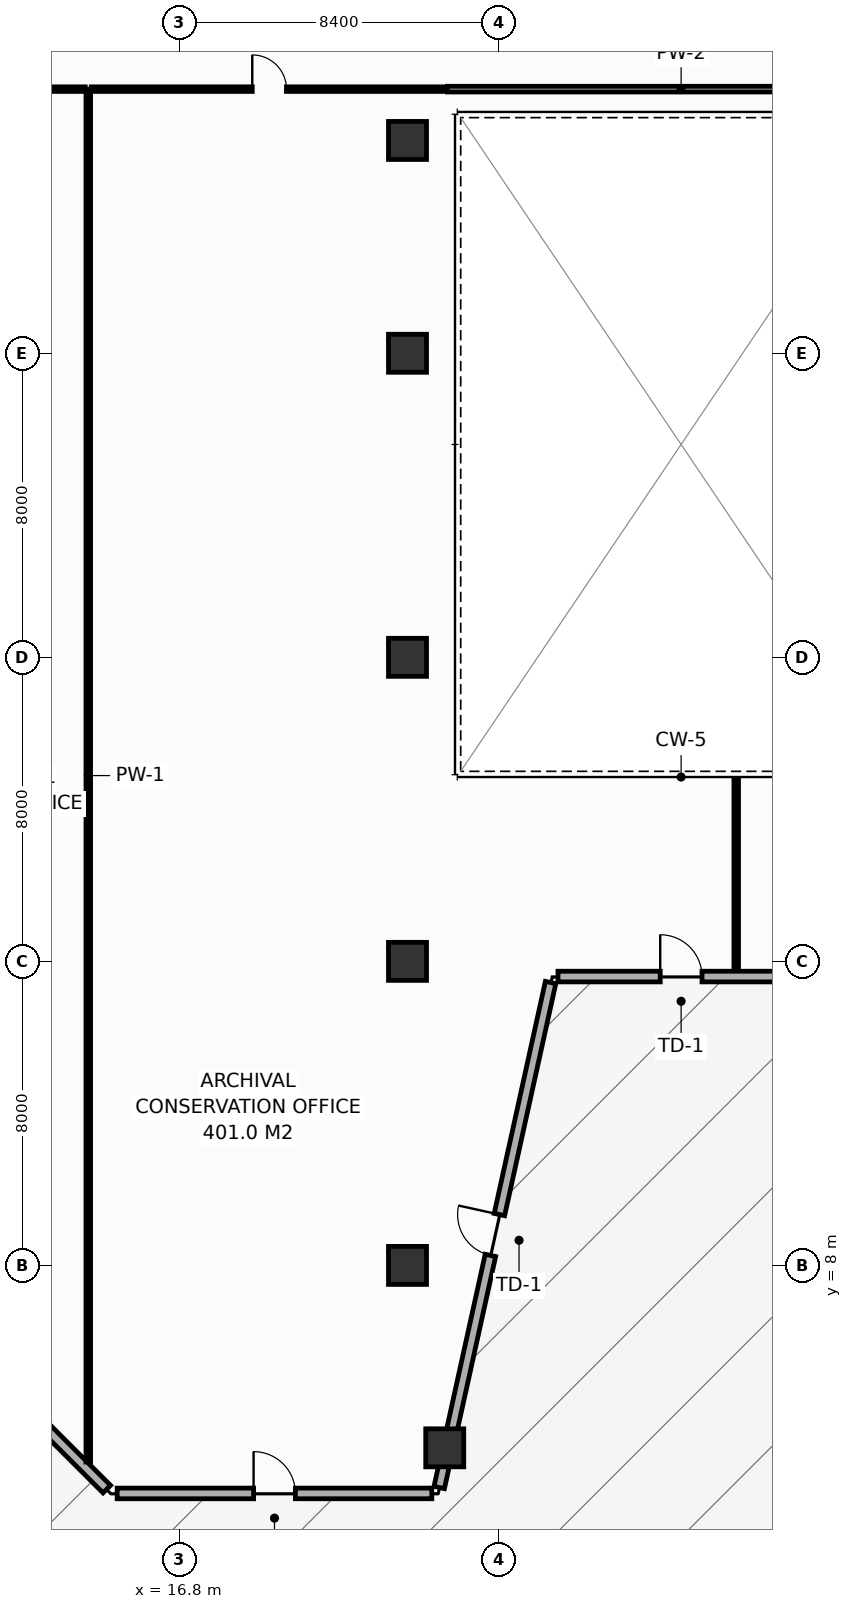
"""IFC4 building model, lengths in metres.
Left out: names, types, materials, properties, quantities, classifications, styles, units other than length and angle.
Written with IfcOpenShell. Run it as: python <this file> out.ifc"""

import sys

from ifc_helpers import new_model, si_unit, direction, frame, frame_2d, origin, origin_2d, place, context, subcontext, project, spatial, rectangle, hollow_rectangle, extrude, element, fill, save


model = new_model("IFC4")
c1 = context("Model", 3, precision=1e-05, world=origin(), true_north=direction((0.0, 1.0)))
c2 = subcontext(c1, "Body", "Model", "MODEL_VIEW")
j1 = project(units=[si_unit("LENGTHUNIT", "METRE"), si_unit("PLANEANGLEUNIT", "RADIAN")], contexts=[c1])
p1 = place(None, origin())
s1 = spatial("IfcSite", under=j1, at=p1, CompositionType="ELEMENT")
p2 = place(p1, origin())
s2 = spatial("IfcBuilding", under=s1, at=p2, CompositionType="ELEMENT")
p3 = place(p2, frame((0.0, 0.0, 27.6)))
s3 = spatial("IfcBuildingStorey", under=s2, at=p3, CompositionType="ELEMENT", Elevation=27.6)
for number, where, z_axis, x_axis in (
    (1, (23.78, 3.2, 0.0), (0.0, 0.0, 1.0), (1.0, 0.0, 0.0)),
    (2, (22.8, 8.0, 0.0), (0.0, 0.0, 1.0), (1.0, 0.0, 0.0)),
    (3, (22.8, 16.0, 0.0), (0.0, 0.0, 1.0), (1.0, 0.0, 0.0)),
    (4, (22.8, 24.0, 0.0), (0.0, 0.0, 1.0), (1.0, 0.0, 0.0)),
    (5, (22.8, 32.0, 0.0), (0.0, 0.0, 1.0), (1.0, 0.0, 0.0)),
    (6, (22.8, 37.6, 0.0), (0.0, 0.0, 1.0), (1.0, 0.0, 0.0)),
):
    element("IfcColumn", number, at=place(p3, frame(where, z_axis=z_axis, x_axis=x_axis)), inside=s3, PredefinedType="COLUMN", context=c2, shape_type="SweptSolid", body=[
        extrude(hollow_rectangle(XDim=1.0, YDim=1.0, WallThickness=0.045, at=origin_2d()), origin(), (0.0, 0.0, 1.0), 5.4),
    ])
p4 = place(p3, frame((11.913, 5.087, 0.0), z_axis=(0.0, 0.0, 1.0), x_axis=(0.707106781187, -0.707106781187, 0.0)))
e7 = element("IfcWall", 7, at=p4, inside=s3, PredefinedType="STANDARD", context=c2, shape_type="SweptSolid", body=[
    extrude(rectangle(XDim=4.206, YDim=0.28, at=frame_2d((2.103, 0.0))), origin(), (0.0, 0.0, 1.0), 5.15),
])
p5 = place(p3, frame((15.16, 2.0, 0.0), z_axis=(0.0, 0.0, 1.0), x_axis=(1.0, 0.0, 0.0)))
e8 = element("IfcWall", 8, at=p5, inside=s3, PredefinedType="STANDARD", context=c2, shape_type="SweptSolid", body=[
    extrude(rectangle(XDim=8.28, YDim=0.28, at=frame_2d((4.14, 0.0))), origin(), (0.0, 0.0, 1.0), 5.15),
])
p6 = place(p5, frame((3.59, 0.0, 0.0)))
e9 = element("IfcOpeningElement", 9, at=p6, cuts=e8, PredefinedType="OPENING", context=c2, shape_type="SweptSolid", body=[
    extrude(rectangle(XDim=1.1, YDim=2.2, at=frame_2d((0.55, 1.1))), frame((0.0, 0.15, 0.0), z_axis=(0.0, -1.0, 0.0), x_axis=(1.0, 0.0, 0.0)), (0.0, 0.0, 1.0), 0.3),
])
p7 = place(p3, frame((23.635, 2.156, 0.0), z_axis=(0.0, 0.0, 1.0), x_axis=(0.215397075206, 0.976526548535, 0.0)))
e10 = element("IfcWall", 10, at=p7, inside=s3, PredefinedType="STANDARD", context=c2, shape_type="SweptSolid", body=[
    extrude(rectangle(XDim=13.607, YDim=0.28, at=frame_2d((6.803, 0.0))), origin(), (0.0, 0.0, 1.0), 5.15),
])
p8 = place(p7, frame((6.254, 0.0, 0.0)))
e11 = element("IfcOpeningElement", 11, at=p8, cuts=e10, PredefinedType="OPENING", context=c2, shape_type="SweptSolid", body=[
    extrude(rectangle(XDim=1.1, YDim=2.2, at=frame_2d((0.55, 1.1))), frame((0.0, 0.15, 0.0), z_axis=(0.0, -1.0, 0.0), x_axis=(1.0, 0.0, 0.0)), (0.0, 0.0, 1.0), 0.3),
])
p9 = place(p3, frame((26.76, 15.6, 0.0), z_axis=(0.0, 0.0, 1.0), x_axis=(1.0, 0.0, 0.0)))
e12 = element("IfcWall", 12, at=p9, inside=s3, PredefinedType="STANDARD", context=c2, shape_type="SweptSolid", body=[
    extrude(rectangle(XDim=6.48, YDim=0.28, at=frame_2d((3.24, 0.0))), origin(), (0.0, 0.0, 1.0), 5.15),
])
p10 = place(p9, frame((2.69, 0.0, 0.0)))
e13 = element("IfcOpeningElement", 13, at=p10, cuts=e12, PredefinedType="OPENING", context=c2, shape_type="SweptSolid", body=[
    extrude(rectangle(XDim=1.1, YDim=2.2, at=frame_2d((0.55, 1.1))), frame((0.0, 0.15, 0.0), z_axis=(0.0, -1.0, 0.0), x_axis=(1.0, 0.0, 0.0)), (0.0, 0.0, 1.0), 0.3),
])
p11 = place(p3, frame((14.4, 2.826, 0.0), z_axis=(0.0, 0.0, 1.0), x_axis=(0.0, 1.0, 0.0)))
e14 = element("IfcWall", 14, at=p11, inside=s3, PredefinedType="PARTITIONING", context=c2, shape_type="SweptSolid", body=[
    extrude(rectangle(XDim=36.124, YDim=0.12, at=frame_2d((18.062, 0.0))), origin(), (0.0, 0.0, 1.0), 4.235),
])
p12 = place(p3, frame((31.45, 15.76, 0.0), z_axis=(0.0, 0.0, 1.0), x_axis=(0.0, 1.0, 0.0)))
e15 = element("IfcWall", 15, at=p12, inside=s3, PredefinedType="PARTITIONING", context=c2, shape_type="SweptSolid", body=[
    extrude(rectangle(XDim=5.02, YDim=0.12, at=frame_2d((2.51, 0.0))), origin(), (0.0, 0.0, 1.0), 2.935),
])
p13 = place(p3, frame((6.432, 38.95, 0.0), z_axis=(0.0, 0.0, 1.0), x_axis=(1.0, 0.0, 0.0)))
e16 = element("IfcWall", 16, at=p13, inside=s3, PredefinedType="PARTITIONING", context=c2, shape_type="SweptSolid", body=[
    extrude(rectangle(XDim=7.888, YDim=0.12, at=frame_2d((3.944, 0.0))), origin(), (0.0, 0.0, 1.0), 4.235),
])
p14 = place(p13, frame((3.494, 0.0, 0.0)))
e17 = element("IfcOpeningElement", 17, at=p14, cuts=e16, PredefinedType="OPENING", context=c2, shape_type="SweptSolid", body=[
    extrude(rectangle(XDim=0.9, YDim=2.1, at=frame_2d((0.45, 1.05))), frame((0.0, 0.07, 0.0), z_axis=(0.0, -1.0, 0.0), x_axis=(1.0, 0.0, 0.0)), (0.0, 0.0, 1.0), 0.14),
])
p15 = place(p3, frame((14.48, 38.95, 0.0), z_axis=(0.0, 0.0, 1.0), x_axis=(1.0, 0.0, 0.0)))
e18 = element("IfcWall", 18, at=p15, inside=s3, PredefinedType="PARTITIONING", context=c2, shape_type="SweptSolid", body=[
    extrude(rectangle(XDim=9.37, YDim=0.12, at=frame_2d((4.685, 0.0))), origin(), (0.0, 0.0, 1.0), 4.235),
])
p16 = place(p15, frame((4.235, 0.0, 0.0)))
e19 = element("IfcOpeningElement", 19, at=p16, cuts=e18, PredefinedType="OPENING", context=c2, shape_type="SweptSolid", body=[
    extrude(rectangle(XDim=0.9, YDim=2.1, at=frame_2d((0.45, 1.05))), frame((0.0, 0.07, 0.0), z_axis=(0.0, -1.0, 0.0), x_axis=(1.0, 0.0, 0.0)), (0.0, 0.0, 1.0), 0.14),
])
p17 = place(p3, frame((23.85, 38.95, 0.0), z_axis=(0.0, 0.0, 1.0), x_axis=(1.0, 0.0, 0.0)))
e20 = element("IfcWall", 20, at=p17, inside=s3, PredefinedType="PARTITIONING", context=c2, shape_type="SweptSolid", body=[
    extrude(rectangle(XDim=12.3, YDim=0.15, at=frame_2d((6.15, 0.0))), origin(), (0.0, 0.0, 1.0), 5.15),
])
p18 = place(p6, origin())
e21 = element("IfcDoor", 21, at=p18, inside=s3, OperationType="SINGLE_SWING_LEFT", PredefinedType="DOOR", context=c2, shape_type="SweptSolid", body=[
    extrude(rectangle(XDim=1.1, YDim=2.2, at=frame_2d((0.55, 1.1))), frame((0.0, 0.025, 0.0), z_axis=(0.0, -1.0, 0.0), x_axis=(1.0, 0.0, 0.0)), (0.0, 0.0, 1.0), 0.05),
])
fill(e9, e21)
p19 = place(p8, origin())
e22 = element("IfcDoor", 22, at=p19, inside=s3, OperationType="SINGLE_SWING_RIGHT", PredefinedType="DOOR", context=c2, shape_type="SweptSolid", body=[
    extrude(rectangle(XDim=1.1, YDim=2.2, at=frame_2d((0.55, 1.1))), frame((0.0, 0.025, 0.0), z_axis=(0.0, -1.0, 0.0), x_axis=(1.0, 0.0, 0.0)), (0.0, 0.0, 1.0), 0.05),
])
fill(e11, e22)
p20 = place(p10, origin())
e23 = element("IfcDoor", 23, at=p20, inside=s3, OperationType="SINGLE_SWING_LEFT", PredefinedType="DOOR", context=c2, shape_type="SweptSolid", body=[
    extrude(rectangle(XDim=1.1, YDim=2.2, at=frame_2d((0.55, 1.1))), frame((0.0, 0.025, 0.0), z_axis=(0.0, -1.0, 0.0), x_axis=(1.0, 0.0, 0.0)), (0.0, 0.0, 1.0), 0.05),
])
fill(e13, e23)
p21 = place(p16, origin())
e24 = element("IfcDoor", 24, at=p21, inside=s3, OperationType="SINGLE_SWING_LEFT", PredefinedType="DOOR", context=c2, shape_type="SweptSolid", body=[
    extrude(rectangle(XDim=0.9, YDim=2.1, at=frame_2d((0.45, 1.05))), frame((0.0, 0.025, 0.0), z_axis=(0.0, -1.0, 0.0), x_axis=(1.0, 0.0, 0.0)), (0.0, 0.0, 1.0), 0.05),
])
fill(e19, e24)
save(model, sys.argv[1])
